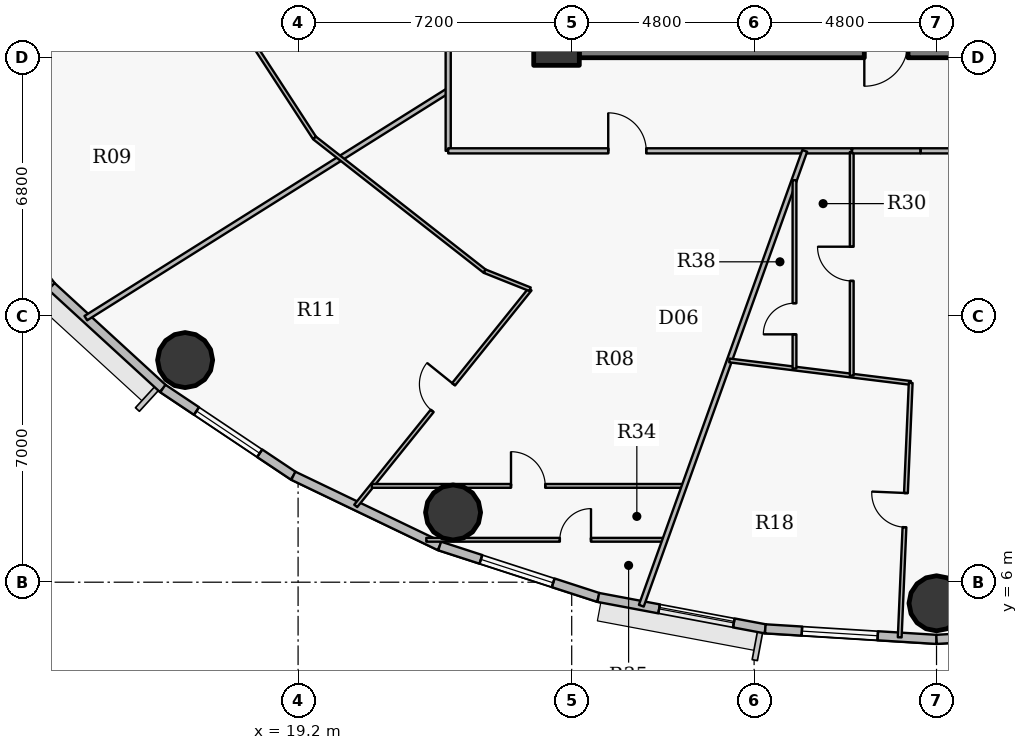
"""IFC4 building model, lengths in metres.
Left out: names, types, materials, properties, quantities, classifications, styles, units other than length and angle.
Written with IfcOpenShell. Run it as: python <this file> out.ifc"""

import sys

from ifc_helpers import new_model, si_unit, direction, frame, frame_2d, origin, origin_2d, place, context, subcontext, project, spatial, rectangle, hollow_circle, extrude, source, transform, mapped, element, fill, save


model = new_model("IFC4")
c1 = context("Model", 3, precision=1e-05, world=origin(), true_north=direction((0.0, 1.0)))
c2 = subcontext(c1, "Body", "Model", "MODEL_VIEW")
j1 = project(units=[si_unit("LENGTHUNIT", "METRE"), si_unit("PLANEANGLEUNIT", "RADIAN")], contexts=[c1])
p1 = place(None, origin())
s1 = spatial("IfcSite", under=j1, at=p1, CompositionType="ELEMENT")
p2 = place(p1, origin())
s2 = spatial("IfcBuilding", under=s1, at=p2, CompositionType="ELEMENT")
p3 = place(p2, frame((0.0, 0.0, 119.7)))
s3 = spatial("IfcBuildingStorey", under=s2, at=p3, CompositionType="ELEMENT", Elevation=119.7)
p4 = place(p3, frame((26.0, 20.2, 0.0), z_axis=(0.0, 0.0, 1.0), x_axis=(1.0, 0.0, 0.0)))
e1 = element("IfcColumn", 1, at=p4, inside=s3, PredefinedType="COLUMN", context=c2, shape_type="SweptSolid", body=[
    extrude(rectangle(XDim=1.2, YDim=1.2, at=origin_2d()), origin(), (0.0, 0.0, 1.0), 3.75),
])
p5 = place(p3, frame((45.4, 20.2, 0.0), z_axis=(0.0, 0.0, 1.0), x_axis=(-1.0, 0.0, 0.0)))
e2 = element("IfcWall", 2, at=p5, inside=s3, PredefinedType="SHEAR", context=c2, shape_type="SweptSolid", body=[
    extrude(rectangle(XDim=18.8, YDim=0.8, at=frame_2d((9.4, 0.0))), origin(), (0.0, 0.0, 1.0), 2.95),
])
p6 = place(p5, frame((10.15, 0.0, 0.0)))
e3 = element("IfcOpeningElement", 3, at=p6, cuts=e2, PredefinedType="OPENING", context=c2, shape_type="SweptSolid", body=[
    extrude(rectangle(XDim=1.15, YDim=2.15, at=origin_2d()), frame((0.575, 0.41, 1.075), z_axis=(0.0, -1.0, 0.0), x_axis=(1.0, 0.0, 0.0)), (0.0, 0.0, 1.0), 0.82),
])
for number, where, z_axis, x_axis in (
    (4, (16.227, 11.844, 0.0), (0.0, 0.0, 1.0), (1.0, 0.0, 0.0)),
    (5, (23.278, 7.835, 0.0), (0.0, 0.0, 1.0), (1.0, 0.0, 0.0)),
    (6, (36.0, 5.445, 0.0), (0.0, 0.0, 1.0), (1.0, 0.0, 0.0)),
):
    element("IfcColumn", number, at=place(p3, frame(where, z_axis=z_axis, x_axis=x_axis)), inside=s3, PredefinedType="COLUMN", context=c2, shape_type="SweptSolid", body=[
        extrude(hollow_circle(Radius=0.725, WallThickness=0.042, at=origin_2d()), origin(), (0.0, 0.0, 1.0), 3.75),
    ])
p7 = place(p3, frame((12.711, 13.783, 0.0), z_axis=(0.0, 0.0, 1.0), x_axis=(-0.616272103517, 0.787533297345, 0.0)))
e7 = element("IfcWall", 7, at=p7, inside=s3, PredefinedType="SOLIDWALL", context=c2, shape_type="SweptSolid", body=[
    extrude(rectangle(XDim=3.823, YDim=0.24, at=frame_2d((1.912, 0.0))), origin(), (0.0, 0.0, 1.0), 3.5),
])
p8 = place(p7, frame((0.912, 0.0, 0.9)))
e8 = element("IfcOpeningElement", 8, at=p8, cuts=e7, PredefinedType="OPENING", context=c2, shape_type="SweptSolid", body=[
    extrude(rectangle(XDim=2.0, YDim=1.75, at=origin_2d()), frame((1.0, 0.13, 0.875), z_axis=(0.0, -1.0, 0.0), x_axis=(1.0, 0.0, 0.0)), (0.0, 0.0, 1.0), 0.26),
])
p9 = place(p3, frame((15.642, 11.097, 0.0), z_axis=(0.0, 0.0, 1.0), x_axis=(-0.737113356241, 0.675769117414, 0.0)))
e9 = element("IfcWall", 9, at=p9, inside=s3, PredefinedType="SOLIDWALL", context=c2, shape_type="SweptSolid", body=[
    extrude(rectangle(XDim=3.976, YDim=0.24, at=frame_2d((1.988, 0.0))), origin(), (0.0, 0.0, 1.0), 3.5),
])
p10 = place(p3, frame((19.075, 8.801, 0.0), z_axis=(0.0, 0.0, 1.0), x_axis=(-0.831221811447, 0.555940914284, 0.0)))
e10 = element("IfcWall", 10, at=p10, inside=s3, PredefinedType="SOLIDWALL", context=c2, shape_type="SweptSolid", body=[
    extrude(rectangle(XDim=4.13, YDim=0.24, at=frame_2d((2.065, 0.0))), origin(), (0.0, 0.0, 1.0), 3.5),
])
p11 = place(p10, frame((1.065, 0.0, 0.9)))
e11 = element("IfcOpeningElement", 11, at=p11, cuts=e10, PredefinedType="OPENING", context=c2, shape_type="SweptSolid", body=[
    extrude(rectangle(XDim=2.0, YDim=1.75, at=origin_2d()), frame((1.0, 0.13, 0.875), z_axis=(0.0, -1.0, 0.0), x_axis=(1.0, 0.0, 0.0)), (0.0, 0.0, 1.0), 0.26),
])
p12 = place(p3, frame((22.926, 6.953, 0.0), z_axis=(0.0, 0.0, 1.0), x_axis=(-0.901589935876, 0.432591709962, 0.0)))
e12 = element("IfcWall", 12, at=p12, inside=s3, PredefinedType="SOLIDWALL", context=c2, shape_type="SweptSolid", body=[
    extrude(rectangle(XDim=4.272, YDim=0.24, at=frame_2d((2.136, 0.0))), origin(), (0.0, 0.0, 1.0), 3.5),
])
p13 = place(p3, frame((27.1, 5.599, 0.0), z_axis=(0.0, 0.0, 1.0), x_axis=(-0.951211346073, 0.308540070495, 0.0)))
e13 = element("IfcWall", 13, at=p13, inside=s3, PredefinedType="SOLIDWALL", context=c2, shape_type="SweptSolid", body=[
    extrude(rectangle(XDim=4.388, YDim=0.24, at=frame_2d((2.194, 0.0))), origin(), (0.0, 0.0, 1.0), 3.5),
])
p14 = place(p13, frame((1.248, 0.0, 0.9)))
e14 = element("IfcOpeningElement", 14, at=p14, cuts=e13, PredefinedType="OPENING", context=c2, shape_type="SweptSolid", body=[
    extrude(rectangle(XDim=2.0, YDim=1.75, at=origin_2d()), frame((1.0, 0.13, 0.875), z_axis=(0.0, -1.0, 0.0), x_axis=(1.0, 0.0, 0.0)), (0.0, 0.0, 1.0), 0.26),
])
p15 = place(p3, frame((31.494, 4.773, 0.0), z_axis=(0.0, 0.0, 1.0), x_axis=(-0.982789252177, 0.184730305596, 0.0)))
e15 = element("IfcWall", 15, at=p15, inside=s3, PredefinedType="SOLIDWALL", context=c2, shape_type="SweptSolid", body=[
    extrude(rectangle(XDim=4.471, YDim=0.24, at=frame_2d((2.235, 0.0))), origin(), (0.0, 0.0, 1.0), 3.5),
])
p16 = place(p15, frame((0.843, 0.0, 0.9)))
e16 = element("IfcOpeningElement", 16, at=p16, cuts=e15, PredefinedType="OPENING", context=c2, shape_type="SweptSolid", body=[
    extrude(rectangle(XDim=2.0, YDim=1.75, at=origin_2d()), frame((1.0, 0.13, 0.875), z_axis=(0.0, -1.0, 0.0), x_axis=(1.0, 0.0, 0.0)), (0.0, 0.0, 1.0), 0.26),
])
p17 = place(p3, frame((36.0, 4.495, 0.0), z_axis=(0.0, 0.0, 1.0), x_axis=(-0.998107531589, 0.061492726276, 0.0)))
e17 = element("IfcWall", 17, at=p17, inside=s3, PredefinedType="SOLIDWALL", context=c2, shape_type="SweptSolid", body=[
    extrude(rectangle(XDim=4.514, YDim=0.24, at=frame_2d((2.257, 0.0))), origin(), (0.0, 0.0, 1.0), 3.5),
])
p18 = place(p17, frame((1.55, 0.0, 0.9)))
e18 = element("IfcOpeningElement", 18, at=p18, cuts=e17, PredefinedType="OPENING", context=c2, shape_type="SweptSolid", body=[
    extrude(rectangle(XDim=2.0, YDim=1.75, at=origin_2d()), frame((1.0, 0.13, 0.875), z_axis=(0.0, -1.0, 0.0), x_axis=(1.0, 0.0, 0.0)), (0.0, 0.0, 1.0), 0.26),
])
p19 = place(p3, frame((40.506, 4.773, 0.0), z_axis=(0.0, 0.0, 1.0), x_axis=(-0.998107531589, -0.061492726276, 0.0)))
e19 = element("IfcWall", 19, at=p19, inside=s3, PredefinedType="SOLIDWALL", context=c2, shape_type="SweptSolid", body=[
    extrude(rectangle(XDim=4.514, YDim=0.24, at=frame_2d((2.257, 0.0))), origin(), (0.0, 0.0, 1.0), 3.5),
])
p20 = place(p19, frame((1.257, 0.0, 0.9)))
e20 = element("IfcOpeningElement", 20, at=p20, cuts=e19, PredefinedType="OPENING", context=c2, shape_type="SweptSolid", body=[
    extrude(rectangle(XDim=2.0, YDim=1.75, at=origin_2d()), frame((1.0, 0.13, 0.875), z_axis=(0.0, -1.0, 0.0), x_axis=(1.0, 0.0, 0.0)), (0.0, 0.0, 1.0), 0.26),
])
p21 = place(p3, frame((8.763, 19.792, 0.0), z_axis=(0.0, 0.0, 1.0), x_axis=(0.96671793708, 0.255844542893, 0.0)))
e21 = element("IfcWall", 21, at=p21, inside=s3, PredefinedType="PARTITIONING", context=c2, shape_type="SweptSolid", body=[
    extrude(rectangle(XDim=8.385, YDim=0.1, at=frame_2d((4.192, 0.0))), origin(), (0.0, 0.0, 1.0), 2.935),
])
p22 = place(p21, frame((4.835, 0.0, 0.0)))
e22 = element("IfcOpeningElement", 22, at=p22, cuts=e21, PredefinedType="OPENING", context=c2, shape_type="SweptSolid", body=[
    extrude(rectangle(XDim=0.9, YDim=2.1, at=origin_2d()), frame((0.45, 0.06, 1.05), z_axis=(0.0, -1.0, 0.0), x_axis=(1.0, 0.0, 0.0)), (0.0, 0.0, 1.0), 0.12),
])
p23 = place(p3, frame((13.615, 12.948, 0.0), z_axis=(0.0, 0.0, 1.0), x_axis=(0.846963568038, 0.531650932866, 0.0)))
e23 = element("IfcWall", 23, at=p23, inside=s3, PredefinedType="PARTITIONING", context=c2, shape_type="SweptSolid", body=[
    extrude(rectangle(XDim=11.258, YDim=0.135, at=frame_2d((5.629, 0.0))), origin(), (0.0, 0.0, 1.0), 2.935),
])
p24 = place(p3, frame((16.869, 21.937, 0.0), z_axis=(0.0, 0.0, 1.0), x_axis=(0.545394651961, -0.838179380331, 0.0)))
e24 = element("IfcWall", 24, at=p24, inside=s3, PredefinedType="PARTITIONING", context=c2, shape_type="SweptSolid", body=[
    extrude(rectangle(XDim=5.068, YDim=0.1, at=frame_2d((2.534, 0.0))), origin(), (0.0, 0.0, 1.0), 3.5),
])
p25 = place(p3, frame((19.634, 17.689, 0.0), z_axis=(0.0, 0.0, 1.0), x_axis=(0.787333679705, -0.616527109544, 0.0)))
e25 = element("IfcWall", 25, at=p25, inside=s3, PredefinedType="PARTITIONING", context=c2, shape_type="SweptSolid", body=[
    extrude(rectangle(XDim=5.685, YDim=0.1, at=frame_2d((2.842, 0.0))), origin(), (0.0, 0.0, 1.0), 2.935),
])
p26 = place(p3, frame((20.717, 8.007, 0.0), z_axis=(0.0, 0.0, 1.0), x_axis=(0.626926430663, 0.779078462375, 0.0)))
e26 = element("IfcWall", 26, at=p26, inside=s3, PredefinedType="PARTITIONING", context=c2, shape_type="SweptSolid", body=[
    extrude(rectangle(XDim=7.317, YDim=0.1, at=frame_2d((3.658, 0.0))), origin(), (0.0, 0.0, 1.0), 2.935),
])
p27 = place(p26, frame((3.208, 0.0, 0.0)))
e27 = element("IfcOpeningElement", 27, at=p27, cuts=e26, PredefinedType="OPENING", context=c2, shape_type="SweptSolid", body=[
    extrude(rectangle(XDim=0.9, YDim=2.1, at=origin_2d()), frame((0.45, 0.06, 1.05), z_axis=(0.0, -1.0, 0.0), x_axis=(1.0, 0.0, 0.0)), (0.0, 0.0, 1.0), 0.12),
])
p28 = place(p3, frame((21.141, 8.534, 0.0), z_axis=(0.0, 0.0, 1.0), x_axis=(1.0, 0.0, 0.0)))
e28 = element("IfcWall", 28, at=p28, inside=s3, PredefinedType="PARTITIONING", context=c2, shape_type="SweptSolid", body=[
    extrude(rectangle(XDim=8.224, YDim=0.1, at=frame_2d((4.112, 0.0))), origin(), (0.0, 0.0, 1.0), 2.935),
])
p29 = place(p28, frame((3.662, 0.0, 0.0)))
e29 = element("IfcOpeningElement", 29, at=p29, cuts=e28, PredefinedType="OPENING", context=c2, shape_type="SweptSolid", body=[
    extrude(rectangle(XDim=0.9, YDim=2.1, at=origin_2d()), frame((0.45, 0.06, 1.05), z_axis=(0.0, -1.0, 0.0), x_axis=(1.0, 0.0, 0.0)), (0.0, 0.0, 1.0), 0.12),
])
p30 = place(p3, frame((22.574, 7.116, 0.0), z_axis=(0.0, 0.0, 1.0), x_axis=(1.0, 0.0, 0.0)))
e30 = element("IfcWall", 30, at=p30, inside=s3, PredefinedType="PARTITIONING", context=c2, shape_type="SweptSolid", body=[
    extrude(rectangle(XDim=6.281, YDim=0.1, at=frame_2d((3.141, 0.0))), origin(), (0.0, 0.0, 1.0), 2.935),
])
p31 = place(p30, frame((3.514, 0.0, 0.0)))
e31 = element("IfcOpeningElement", 31, at=p31, cuts=e30, PredefinedType="OPENING", context=c2, shape_type="SweptSolid", body=[
    extrude(rectangle(XDim=0.82, YDim=2.1, at=origin_2d()), frame((0.41, 0.06, 1.05), z_axis=(0.0, -1.0, 0.0), x_axis=(1.0, 0.0, 0.0)), (0.0, 0.0, 1.0), 0.12),
])
p32 = place(p3, frame((23.15, 17.35, 0.0), z_axis=(0.0, 0.0, 1.0), x_axis=(0.0, 1.0, 0.0)))
e32 = element("IfcWall", 32, at=p32, inside=s3, PredefinedType="PARTITIONING", context=c2, shape_type="SweptSolid", body=[
    extrude(rectangle(XDim=19.3, YDim=0.135, at=frame_2d((9.65, 0.0))), origin(), (0.0, 0.0, 1.0), 2.935),
])
p33 = place(p32, frame((16.264, 0.0, 0.0)))
e33 = element("IfcOpeningElement", 33, at=p33, cuts=e32, PredefinedType="OPENING", context=c2, shape_type="SweptSolid", body=[
    extrude(rectangle(XDim=1.0, YDim=2.15, at=origin_2d()), frame((0.5, 0.078, 1.075), z_axis=(0.0, -1.0, 0.0), x_axis=(1.0, 0.0, 0.0)), (0.0, 0.0, 1.0), 0.155),
])
p34 = place(p32, frame((7.426, 0.0, 0.0)))
e34 = element("IfcOpeningElement", 34, at=p34, cuts=e32, PredefinedType="OPENING", context=c2, shape_type="SweptSolid", body=[
    extrude(rectangle(XDim=1.0, YDim=2.15, at=origin_2d()), frame((0.5, 0.078, 1.075), z_axis=(0.0, -1.0, 0.0), x_axis=(1.0, 0.0, 0.0)), (0.0, 0.0, 1.0), 0.155),
])
p35 = place(p3, frame((23.15, 17.35, 0.0), z_axis=(0.0, 0.0, 1.0), x_axis=(1.0, 0.0, 0.0)))
e35 = element("IfcWall", 35, at=p35, inside=s3, PredefinedType="PARTITIONING", context=c2, shape_type="SweptSolid", body=[
    extrude(rectangle(XDim=10.619, YDim=0.135, at=frame_2d((5.31, 0.0))), origin(), (0.0, 0.0, 1.0), 2.935),
])
p36 = place(p35, frame((4.211, 0.0, 0.0)))
e36 = element("IfcOpeningElement", 36, at=p36, cuts=e35, PredefinedType="OPENING", context=c2, shape_type="SweptSolid", body=[
    extrude(rectangle(XDim=1.0, YDim=2.15, at=origin_2d()), frame((0.5, 0.078, 1.075), z_axis=(0.0, -1.0, 0.0), x_axis=(1.0, 0.0, 0.0)), (0.0, 0.0, 1.0), 0.155),
])
p37 = place(p3, frame((24.109, 14.184, 0.0), z_axis=(0.0, 0.0, 1.0), x_axis=(0.928816677888, -0.370539578017, 0.0)))
e37 = element("IfcWall", 37, at=p37, inside=s3, PredefinedType="PARTITIONING", context=c2, shape_type="SweptSolid", body=[
    extrude(rectangle(XDim=1.286, YDim=0.1, at=frame_2d((0.643, 0.0))), origin(), (0.0, 0.0, 1.0), 3.035),
])
p38 = place(p3, frame((28.232, 5.381, 0.0), z_axis=(0.0, 0.0, 1.0), x_axis=(0.338158615332, 0.941089130145, 0.0)))
e38 = element("IfcWall", 38, at=p38, inside=s3, PredefinedType="PARTITIONING", context=c2, shape_type="SweptSolid", body=[
    extrude(rectangle(XDim=12.718, YDim=0.135, at=frame_2d((6.359, 0.0))), origin(), (0.0, 0.0, 1.0), 2.935),
])
p39 = place(p3, frame((30.551, 11.835, 0.0), z_axis=(0.0, 0.0, 1.0), x_axis=(0.992401646286, -0.123040531728, 0.0)))
e39 = element("IfcWall", 39, at=p39, inside=s3, PredefinedType="PARTITIONING", context=c2, shape_type="SweptSolid", body=[
    extrude(rectangle(XDim=4.806, YDim=0.1, at=frame_2d((2.403, 0.0))), origin(), (0.0, 0.0, 1.0), 3.5),
])
p40 = place(p3, frame((32.262, 11.623, 0.0), z_axis=(0.0, 0.0, 1.0), x_axis=(0.0, 1.0, 0.0)))
e40 = element("IfcWall", 40, at=p40, inside=s3, PredefinedType="PARTITIONING", context=c2, shape_type="SweptSolid", body=[
    extrude(rectangle(XDim=4.955, YDim=0.1, at=frame_2d((2.478, 0.0))), origin(), (0.0, 0.0, 1.0), 3.5),
])
p41 = place(p40, frame((0.899, 0.0, 0.0)))
e41 = element("IfcOpeningElement", 41, at=p41, cuts=e40, PredefinedType="OPENING", context=c2, shape_type="SweptSolid", body=[
    extrude(rectangle(XDim=0.82, YDim=2.1, at=origin_2d()), frame((0.41, 0.06, 1.05), z_axis=(0.0, -1.0, 0.0), x_axis=(1.0, 0.0, 0.0)), (0.0, 0.0, 1.0), 0.12),
])
p42 = place(p3, frame((33.769, 11.436, 0.0), z_axis=(0.0, 0.0, 1.0), x_axis=(0.0, 1.0, 0.0)))
e42 = element("IfcWall", 42, at=p42, inside=s3, PredefinedType="PARTITIONING", context=c2, shape_type="SweptSolid", body=[
    extrude(rectangle(XDim=5.884, YDim=0.1, at=frame_2d((2.942, 0.0))), origin(), (0.0, 0.0, 1.0), 3.5),
])
p43 = place(p42, frame((2.492, 0.0, 0.0)))
e43 = element("IfcOpeningElement", 43, at=p43, cuts=e42, PredefinedType="OPENING", context=c2, shape_type="SweptSolid", body=[
    extrude(rectangle(XDim=0.9, YDim=2.1, at=origin_2d()), frame((0.45, 0.06, 1.05), z_axis=(0.0, -1.0, 0.0), x_axis=(1.0, 0.0, 0.0)), (0.0, 0.0, 1.0), 0.12),
])
p44 = place(p3, frame((35.031, 4.55, 0.0), z_axis=(0.0, 0.0, 1.0), x_axis=(0.043108301027, 0.999070405118, 0.0)))
e44 = element("IfcWall", 44, at=p44, inside=s3, PredefinedType="PARTITIONING", context=c2, shape_type="SweptSolid", body=[
    extrude(rectangle(XDim=6.7, YDim=0.1, at=frame_2d((3.35, 0.0))), origin(), (0.0, 0.0, 1.0), 2.935),
])
p45 = place(p44, frame((2.9, 0.0, 0.0)))
e45 = element("IfcOpeningElement", 45, at=p45, cuts=e44, PredefinedType="OPENING", context=c2, shape_type="SweptSolid", body=[
    extrude(rectangle(XDim=0.9, YDim=2.1, at=origin_2d()), frame((0.45, 0.06, 1.05), z_axis=(0.0, -1.0, 0.0), x_axis=(1.0, 0.0, 0.0)), (0.0, 0.0, 1.0), 0.12),
])
p46 = place(p3, frame((35.584, 17.35, 0.0), z_axis=(0.0, 0.0, 1.0), x_axis=(1.0, 0.0, 0.0)))
e46 = element("IfcWall", 46, at=p46, inside=s3, PredefinedType="PARTITIONING", context=c2, shape_type="SweptSolid", body=[
    extrude(rectangle(XDim=13.266, YDim=0.135, at=frame_2d((6.633, 0.0))), origin(), (0.0, 0.0, 1.0), 2.935),
])
p47 = place(p46, frame((2.757, 0.0, 0.0)))
e47 = element("IfcOpeningElement", 47, at=p47, cuts=e46, PredefinedType="OPENING", context=c2, shape_type="SweptSolid", body=[
    extrude(rectangle(XDim=1.0, YDim=2.15, at=origin_2d()), frame((0.5, 0.078, 1.075), z_axis=(0.0, -1.0, 0.0), x_axis=(1.0, 0.0, 0.0)), (0.0, 0.0, 1.0), 0.155),
])
p48 = place(p3, frame((35.574, 17.35, 0.0), z_axis=(0.0, 0.0, 1.0), x_axis=(-1.0, 0.0, 0.0)))
e48 = element("IfcWall", 48, at=p48, inside=s3, PredefinedType="PARTITIONING", context=c2, shape_type="SweptSolid", body=[
    extrude(rectangle(XDim=1.795, YDim=0.135, at=frame_2d((0.897, 0.0))), origin(), (0.0, 0.0, 1.0), 3.5),
])
p49 = place(p3, frame((25.6, 20.79, 0.0), z_axis=(0.0, 0.0, 1.0), x_axis=(0.0, -1.0, 0.0)))
e49 = element("IfcWall", 49, at=p49, inside=s3, PredefinedType="PARTITIONING", context=c2, shape_type="SweptSolid", body=[
    extrude(rectangle(XDim=0.99, YDim=0.135, at=frame_2d((0.495, 0.0))), origin(), (0.0, 0.0, 1.0), 3.5),
])
p50 = place(p3, frame((25.907, 19.8, 0.0), z_axis=(0.0, 0.0, 1.0), x_axis=(1.0, 0.0, 0.0)))
e50 = element("IfcWall", 50, at=p50, inside=s3, PredefinedType="PARTITIONING", context=c2, shape_type="SweptSolid", body=[
    extrude(rectangle(XDim=0.683, YDim=0.135, at=frame_2d((0.341, 0.0))), origin(), (0.0, 0.0, 1.0), 2.935),
])
m1 = source(origin(), c2, "Body", "SweptSolid", [
    extrude(rectangle(XDim=2.0, YDim=1.75, at=origin_2d()), frame((1.0, 0.03, 0.875), z_axis=(0.0, -1.0, 0.0), x_axis=(1.0, 0.0, 0.0)), (0.0, 0.0, 1.0), 0.06),
])
p51 = place(p11, origin())
e51 = element("IfcWindow", 51, at=p51, inside=s3, PartitioningType="DOUBLE_PANEL_VERTICAL", PredefinedType="WINDOW", context=c2, shape_type="MappedRepresentation", body=[
    mapped(m1, transform((0.0, 0.0, 0.0), x_axis=(1.0, 0.0, 0.0), y_axis=(0.0, 1.0, 0.0), z_axis=(0.0, 0.0, 1.0), scale=1.0)),
])
fill(e11, e51)
p52 = place(p14, origin())
e52 = element("IfcWindow", 52, at=p52, inside=s3, PartitioningType="DOUBLE_PANEL_VERTICAL", PredefinedType="WINDOW", context=c2, shape_type="MappedRepresentation", body=[
    mapped(m1, transform((0.0, 0.0, 0.0), x_axis=(1.0, 0.0, 0.0), y_axis=(0.0, 1.0, 0.0), z_axis=(0.0, 0.0, 1.0), scale=1.0)),
])
fill(e14, e52)
p53 = place(p16, origin())
e53 = element("IfcWindow", 53, at=p53, inside=s3, PartitioningType="DOUBLE_PANEL_VERTICAL", PredefinedType="WINDOW", context=c2, shape_type="MappedRepresentation", body=[
    mapped(m1, transform((0.0, 0.0, 0.0), x_axis=(1.0, 0.0, 0.0), y_axis=(0.0, 1.0, 0.0), z_axis=(0.0, 0.0, 1.0), scale=1.0)),
])
fill(e16, e53)
p54 = place(p18, origin())
e54 = element("IfcWindow", 54, at=p54, inside=s3, PartitioningType="DOUBLE_PANEL_VERTICAL", PredefinedType="WINDOW", context=c2, shape_type="MappedRepresentation", body=[
    mapped(m1, transform((0.0, 0.0, 0.0), x_axis=(1.0, 0.0, 0.0), y_axis=(0.0, 1.0, 0.0), z_axis=(0.0, 0.0, 1.0), scale=1.0)),
])
fill(e18, e54)
m2 = source(origin(), c2, "Body", "SweptSolid", [
    extrude(rectangle(XDim=1.0, YDim=2.15, at=origin_2d()), frame((0.5, 0.025, 1.075), z_axis=(0.0, -1.0, 0.0), x_axis=(1.0, 0.0, 0.0)), (0.0, 0.0, 1.0), 0.05),
])
p55 = place(p36, origin())
e55 = element("IfcDoor", 55, at=p55, inside=s3, OperationType="SINGLE_SWING_LEFT", PredefinedType="DOOR", context=c2, shape_type="MappedRepresentation", body=[
    mapped(m2, transform((0.0, 0.0, 0.0), x_axis=(1.0, 0.0, 0.0), y_axis=(0.0, 1.0, 0.0), z_axis=(0.0, 0.0, 1.0), scale=1.0)),
])
fill(e36, e55)
m3 = source(origin(), c2, "Body", "SweptSolid", [
    extrude(rectangle(XDim=0.9, YDim=2.1, at=origin_2d()), frame((0.45, 0.025, 1.05), z_axis=(0.0, -1.0, 0.0), x_axis=(1.0, 0.0, 0.0)), (0.0, 0.0, 1.0), 0.05),
])
p56 = place(p27, origin())
e56 = element("IfcDoor", 56, at=p56, inside=s3, OperationType="SINGLE_SWING_RIGHT", PredefinedType="DOOR", context=c2, shape_type="MappedRepresentation", body=[
    mapped(m3, transform((0.0, 0.0, 0.0), x_axis=(1.0, 0.0, 0.0), y_axis=(0.0, 1.0, 0.0), z_axis=(0.0, 0.0, 1.0), scale=1.0)),
])
fill(e27, e56)
p57 = place(p29, origin())
e57 = element("IfcDoor", 57, at=p57, inside=s3, OperationType="SINGLE_SWING_LEFT", PredefinedType="DOOR", context=c2, shape_type="MappedRepresentation", body=[
    mapped(m3, transform((0.0, 0.0, 0.0), x_axis=(1.0, 0.0, 0.0), y_axis=(0.0, 1.0, 0.0), z_axis=(0.0, 0.0, 1.0), scale=1.0)),
])
fill(e29, e57)
m4 = source(origin(), c2, "Body", "SweptSolid", [
    extrude(rectangle(XDim=0.82, YDim=2.1, at=origin_2d()), frame((0.41, 0.025, 1.05), z_axis=(0.0, -1.0, 0.0), x_axis=(1.0, 0.0, 0.0)), (0.0, 0.0, 1.0), 0.05),
])
p58 = place(p31, origin())
e58 = element("IfcDoor", 58, at=p58, inside=s3, OperationType="SINGLE_SWING_RIGHT", PredefinedType="DOOR", context=c2, shape_type="MappedRepresentation", body=[
    mapped(m4, transform((0.0, 0.0, 0.0), x_axis=(1.0, 0.0, 0.0), y_axis=(0.0, 1.0, 0.0), z_axis=(0.0, 0.0, 1.0), scale=1.0)),
])
fill(e31, e58)
p59 = place(p45, origin())
e59 = element("IfcDoor", 59, at=p59, inside=s3, OperationType="SINGLE_SWING_RIGHT", PredefinedType="DOOR", context=c2, shape_type="MappedRepresentation", body=[
    mapped(m3, transform((0.0, 0.0, 0.0), x_axis=(1.0, 0.0, 0.0), y_axis=(0.0, 1.0, 0.0), z_axis=(0.0, 0.0, 1.0), scale=1.0)),
])
fill(e45, e59)
p60 = place(p43, origin())
e60 = element("IfcDoor", 60, at=p60, inside=s3, OperationType="SINGLE_SWING_RIGHT", PredefinedType="DOOR", context=c2, shape_type="MappedRepresentation", body=[
    mapped(m3, transform((0.0, 0.0, 0.0), x_axis=(1.0, 0.0, 0.0), y_axis=(0.0, 1.0, 0.0), z_axis=(0.0, 0.0, 1.0), scale=1.0)),
])
fill(e43, e60)
p61 = place(p41, origin())
e61 = element("IfcDoor", 61, at=p61, inside=s3, OperationType="SINGLE_SWING_LEFT", PredefinedType="DOOR", context=c2, shape_type="MappedRepresentation", body=[
    mapped(m4, transform((0.0, 0.0, 0.0), x_axis=(1.0, 0.0, 0.0), y_axis=(0.0, 1.0, 0.0), z_axis=(0.0, 0.0, 1.0), scale=1.0)),
])
fill(e41, e61)
save(model, sys.argv[1])
